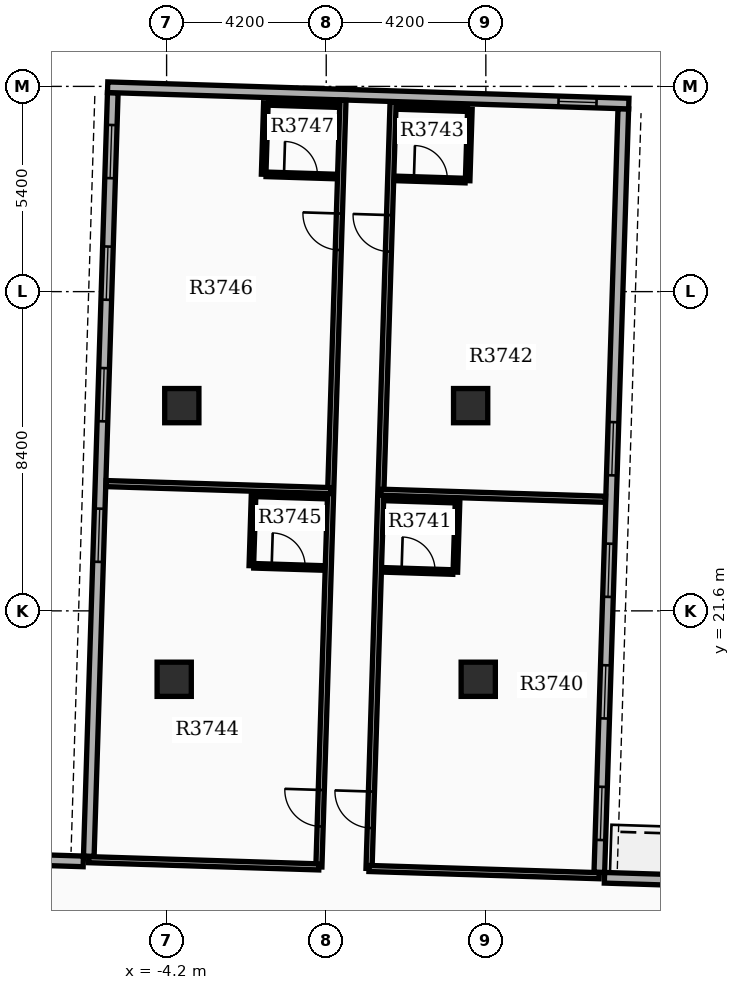
"""IFC4 building model, lengths in metres.
Left out: names, types, materials, properties, quantities, classifications, styles, units other than length and angle.
Written with IfcOpenShell. Run it as: python <this file> out.ifc"""

import sys

from ifc_helpers import new_model, si_unit, direction, frame, frame_2d, origin, origin_2d, place, context, subcontext, project, spatial, rectangle, extrude, element, fill, save


model = new_model("IFC4")
c1 = context("Model", 3, precision=1e-05, world=origin(), true_north=direction((0.0, 1.0)))
c2 = subcontext(c1, "Body", "Model", "MODEL_VIEW")
j1 = project(units=[si_unit("LENGTHUNIT", "METRE"), si_unit("PLANEANGLEUNIT", "RADIAN")], contexts=[c1])
p1 = place(None, origin())
s1 = spatial("IfcSite", under=j1, at=p1, CompositionType="ELEMENT")
p2 = place(p1, origin())
s2 = spatial("IfcBuilding", under=s1, at=p2, CompositionType="ELEMENT")
p3 = place(p2, frame((0.0, 0.0, 232.5)))
s3 = spatial("IfcBuildingStorey", under=s2, at=p3, CompositionType="ELEMENT", Elevation=232.5)
for number, where, z_axis, x_axis in (
    (1, (-4.0, 19.8, 0.0), (0.0, 0.0, 1.0), (1.0, 0.0, 0.0)),
    (2, (4.0, 19.8, 0.0), (0.0, 0.0, 1.0), (1.0, 0.0, 0.0)),
    (3, (-3.8, 27.0, 0.0), (0.0, 0.0, 1.0), (1.0, 0.0, 0.0)),
    (4, (3.8, 27.0, 0.0), (0.0, 0.0, 1.0), (1.0, 0.0, 0.0)),
):
    element("IfcColumn", number, at=place(p3, frame(where, z_axis=z_axis, x_axis=x_axis)), inside=s3, PredefinedType="COLUMN", context=c2, shape_type="SweptSolid", body=[
        extrude(rectangle(XDim=0.9, YDim=0.9, at=origin_2d()), origin(), (0.0, 0.0, 1.0), 3.9),
    ])
p4 = place(p3, frame((7.186, 14.721, 0.0), z_axis=(0.0, 0.0, 1.0), x_axis=(0.031410322165, 0.999506574096, 0.0)))
e5 = element("IfcWall", 5, at=p4, inside=s3, PredefinedType="STANDARD", context=c2, shape_type="SweptSolid", body=[
    extrude(rectangle(XDim=20.1, YDim=0.28, at=frame_2d((10.05, 0.0))), origin(), (0.0, 0.0, 1.0), 3.18),
])
p5 = place(p4, frame((0.85, 0.0, 0.8)))
e6 = element("IfcOpeningElement", 6, at=p5, cuts=e5, PredefinedType="OPENING", context=c2, shape_type="SweptSolid", body=[
    extrude(rectangle(XDim=1.4, YDim=1.6, at=frame_2d((0.7, 0.8))), frame((0.0, 0.15, 0.0), z_axis=(0.0, -1.0, 0.0), x_axis=(1.0, 0.0, 0.0)), (0.0, 0.0, 1.0), 0.3),
])
p6 = place(p4, frame((4.05, 0.0, 0.8)))
e7 = element("IfcOpeningElement", 7, at=p6, cuts=e5, PredefinedType="OPENING", context=c2, shape_type="SweptSolid", body=[
    extrude(rectangle(XDim=1.4, YDim=1.6, at=frame_2d((0.7, 0.8))), frame((0.0, 0.15, 0.0), z_axis=(0.0, -1.0, 0.0), x_axis=(1.0, 0.0, 0.0)), (0.0, 0.0, 1.0), 0.3),
])
p7 = place(p4, frame((7.25, 0.0, 0.8)))
e8 = element("IfcOpeningElement", 8, at=p7, cuts=e5, PredefinedType="OPENING", context=c2, shape_type="SweptSolid", body=[
    extrude(rectangle(XDim=1.4, YDim=1.6, at=frame_2d((0.7, 0.8))), frame((0.0, 0.15, 0.0), z_axis=(0.0, -1.0, 0.0), x_axis=(1.0, 0.0, 0.0)), (0.0, 0.0, 1.0), 0.3),
])
p8 = place(p4, frame((10.45, 0.0, 0.8)))
e9 = element("IfcOpeningElement", 9, at=p8, cuts=e5, PredefinedType="OPENING", context=c2, shape_type="SweptSolid", body=[
    extrude(rectangle(XDim=1.4, YDim=1.6, at=frame_2d((0.7, 0.8))), frame((0.0, 0.15, 0.0), z_axis=(0.0, -1.0, 0.0), x_axis=(1.0, 0.0, 0.0)), (0.0, 0.0, 1.0), 0.3),
])
p9 = place(p3, frame((-5.616, 35.234, 0.0), z_axis=(0.0, 0.0, 1.0), x_axis=(-0.031398187845, -0.999506955354, 0.0)))
e10 = element("IfcWall", 10, at=p9, inside=s3, PredefinedType="STANDARD", context=c2, shape_type="SweptSolid", body=[
    extrude(rectangle(XDim=20.1, YDim=0.28, at=frame_2d((10.05, 0.0))), origin(), (0.0, 0.0, 1.0), 3.18),
])
p10 = place(p9, frame((0.85, 0.0, 0.8)))
e11 = element("IfcOpeningElement", 11, at=p10, cuts=e10, PredefinedType="OPENING", context=c2, shape_type="SweptSolid", body=[
    extrude(rectangle(XDim=1.4, YDim=1.6, at=frame_2d((0.7, 0.8))), frame((0.0, 0.15, 0.0), z_axis=(0.0, -1.0, 0.0), x_axis=(1.0, 0.0, 0.0)), (0.0, 0.0, 1.0), 0.3),
])
p11 = place(p9, frame((4.05, 0.0, 0.8)))
e12 = element("IfcOpeningElement", 12, at=p11, cuts=e10, PredefinedType="OPENING", context=c2, shape_type="SweptSolid", body=[
    extrude(rectangle(XDim=1.4, YDim=1.6, at=frame_2d((0.7, 0.8))), frame((0.0, 0.15, 0.0), z_axis=(0.0, -1.0, 0.0), x_axis=(1.0, 0.0, 0.0)), (0.0, 0.0, 1.0), 0.3),
])
p12 = place(p9, frame((7.25, 0.0, 0.8)))
e13 = element("IfcOpeningElement", 13, at=p12, cuts=e10, PredefinedType="OPENING", context=c2, shape_type="SweptSolid", body=[
    extrude(rectangle(XDim=1.4, YDim=1.6, at=frame_2d((0.7, 0.8))), frame((0.0, 0.15, 0.0), z_axis=(0.0, -1.0, 0.0), x_axis=(1.0, 0.0, 0.0)), (0.0, 0.0, 1.0), 0.3),
])
p13 = place(p9, frame((10.95, 0.0, 0.8)))
e14 = element("IfcOpeningElement", 14, at=p13, cuts=e10, PredefinedType="OPENING", context=c2, shape_type="SweptSolid", body=[
    extrude(rectangle(XDim=1.4, YDim=1.6, at=frame_2d((0.7, 0.8))), frame((0.0, 0.15, 0.0), z_axis=(0.0, -1.0, 0.0), x_axis=(1.0, 0.0, 0.0)), (0.0, 0.0, 1.0), 0.3),
])
p14 = place(p3, frame((7.962, 34.947, 0.0), z_axis=(0.0, 0.0, 1.0), x_axis=(-0.999506679556, 0.031406966164, 0.0)))
e15 = element("IfcWall", 15, at=p14, inside=s3, PredefinedType="STANDARD", context=c2, shape_type="SweptSolid", body=[
    extrude(rectangle(XDim=13.72, YDim=0.28, at=frame_2d((6.86, 0.0))), origin(), (0.0, 0.0, 1.0), 3.18),
])
p15 = place(p14, frame((0.85, 0.0, 0.85)))
e16 = element("IfcOpeningElement", 16, at=p15, cuts=e15, PredefinedType="OPENING", context=c2, shape_type="SweptSolid", body=[
    extrude(rectangle(XDim=1.0, YDim=1.5, at=frame_2d((0.5, 0.75))), frame((0.0, 0.15, 0.0), z_axis=(0.0, -1.0, 0.0), x_axis=(1.0, 0.0, 0.0)), (0.0, 0.0, 1.0), 0.3),
])
p16 = place(p3, frame((13.618, 14.379, 0.0), z_axis=(0.0, 0.0, 1.0), x_axis=(-0.999507224741, 0.031389611199, 0.0)))
e17 = element("IfcWall", 17, at=p16, inside=s3, PredefinedType="STANDARD", context=c2, shape_type="SweptSolid", body=[
    extrude(rectangle(XDim=6.3, YDim=0.28, at=frame_2d((3.15, 0.0))), origin(), (0.0, 0.0, 1.0), 3.18),
])
p17 = place(p3, frame((-12.689, 15.206, 0.0), z_axis=(0.0, 0.0, 1.0), x_axis=(0.999507262922, -0.031388395416, 0.0)))
e18 = element("IfcWall", 18, at=p17, inside=s3, PredefinedType="STANDARD", context=c2, shape_type="SweptSolid", body=[
    extrude(rectangle(XDim=6.3, YDim=0.28, at=frame_2d((3.15, 0.0))), origin(), (0.0, 0.0, 1.0), 3.18),
])
p18 = place(p3, frame((1.126, 14.822, 0.0), z_axis=(0.0, 0.0, 1.0), x_axis=(0.031403945422, 0.99950677447, 0.0)))
e19 = element("IfcWall", 19, at=p18, inside=s3, PredefinedType="PARTITIONING", context=c2, shape_type="SweptSolid", body=[
    extrude(rectangle(XDim=20.182, YDim=0.16, at=frame_2d((10.091, 0.0))), origin(), (0.0, 0.0, 1.0), 3.17),
])
p19 = place(p18, frame((1.065, 0.0, 0.0)))
e20 = element("IfcOpeningElement", 20, at=p19, cuts=e19, PredefinedType="OPENING", context=c2, shape_type="SweptSolid", body=[
    extrude(rectangle(XDim=0.96, YDim=2.15, at=frame_2d((0.48, 1.075))), frame((0.0, 0.09, 0.0), z_axis=(0.0, -1.0, 0.0), x_axis=(1.0, 0.0, 0.0)), (0.0, 0.0, 1.0), 0.18),
])
p20 = place(p18, frame((16.24, 0.0, 0.0)))
e21 = element("IfcOpeningElement", 21, at=p20, cuts=e19, PredefinedType="OPENING", context=c2, shape_type="SweptSolid", body=[
    extrude(rectangle(XDim=0.96, YDim=2.15, at=frame_2d((0.48, 1.075))), frame((0.0, 0.09, 0.0), z_axis=(0.0, -1.0, 0.0), x_axis=(1.0, 0.0, 0.0)), (0.0, 0.0, 1.0), 0.18),
])
p21 = place(p3, frame((1.126, 14.822, 0.0), z_axis=(0.0, 0.0, 1.0), x_axis=(0.999506122926, -0.031424675557, 0.0)))
e22 = element("IfcWall", 22, at=p21, inside=s3, PredefinedType="PARTITIONING", context=c2, shape_type="SweptSolid", body=[
    extrude(rectangle(XDim=6.06, YDim=0.16, at=frame_2d((3.03, 0.0))), origin(), (0.0, 0.0, 1.0), 3.17),
])
p22 = place(p3, frame((1.437, 24.722, 0.0), z_axis=(0.0, 0.0, 1.0), x_axis=(0.999506054485, -0.031426852351, 0.0)))
e23 = element("IfcWall", 23, at=p22, inside=s3, PredefinedType="PARTITIONING", context=c2, shape_type="SweptSolid", body=[
    extrude(rectangle(XDim=5.912, YDim=0.16, at=frame_2d((2.956, 0.0))), origin(), (0.0, 0.0, 1.0), 3.17),
])
p23 = place(p3, frame((1.513, 22.679, 0.0), z_axis=(0.0, 0.0, 1.0), x_axis=(0.999507221803, -0.031389704724, 0.0)))
e24 = element("IfcWall", 24, at=p23, inside=s3, PredefinedType="PARTITIONING", context=c2, shape_type="SweptSolid", body=[
    extrude(rectangle(XDim=1.82, YDim=0.12, at=frame_2d((0.91, 0.0))), origin(), (0.0, 0.0, 1.0), 3.17),
])
p24 = place(p23, frame((0.47, 0.0, 0.0)))
e25 = element("IfcOpeningElement", 25, at=p24, cuts=e24, PredefinedType="OPENING", context=c2, shape_type="SweptSolid", body=[
    extrude(rectangle(XDim=0.88, YDim=2.1, at=frame_2d((0.44, 1.05))), frame((0.0, 0.07, 0.0), z_axis=(0.0, -1.0, 0.0), x_axis=(1.0, 0.0, 0.0)), (0.0, 0.0, 1.0), 0.14),
])
p25 = place(p3, frame((1.572, 24.558, 0.0), z_axis=(0.0, 0.0, 1.0), x_axis=(0.999507221803, -0.031389704724, 0.0)))
e26 = element("IfcWall", 26, at=p25, inside=s3, PredefinedType="PARTITIONING", context=c2, shape_type="SweptSolid", body=[
    extrude(rectangle(XDim=1.82, YDim=0.12, at=frame_2d((0.91, 0.0))), origin(), (0.0, 0.0, 1.0), 3.17),
])
p26 = place(p3, frame((3.397, 22.619, 0.0), z_axis=(0.0, 0.0, 1.0), x_axis=(0.031425292588, 0.999506103526, 0.0)))
e27 = element("IfcWall", 27, at=p26, inside=s3, PredefinedType="PARTITIONING", context=c2, shape_type="SweptSolid", body=[
    extrude(rectangle(XDim=1.88, YDim=0.12, at=frame_2d((0.94, 0.0))), origin(), (0.0, 0.0, 1.0), 3.17),
])
p27 = place(p3, frame((1.837, 32.979, 0.0), z_axis=(0.0, 0.0, 1.0), x_axis=(0.999507221803, -0.031389704724, 0.0)))
e28 = element("IfcWall", 28, at=p27, inside=s3, PredefinedType="PARTITIONING", context=c2, shape_type="SweptSolid", body=[
    extrude(rectangle(XDim=1.82, YDim=0.12, at=frame_2d((0.91, 0.0))), origin(), (0.0, 0.0, 1.0), 3.17),
])
p28 = place(p27, frame((0.47, 0.0, 0.0)))
e29 = element("IfcOpeningElement", 29, at=p28, cuts=e28, PredefinedType="OPENING", context=c2, shape_type="SweptSolid", body=[
    extrude(rectangle(XDim=0.88, YDim=2.1, at=frame_2d((0.44, 1.05))), frame((0.0, 0.07, 0.0), z_axis=(0.0, -1.0, 0.0), x_axis=(1.0, 0.0, 0.0)), (0.0, 0.0, 1.0), 0.14),
])
p29 = place(p3, frame((1.896, 34.858, 0.0), z_axis=(0.0, 0.0, 1.0), x_axis=(0.999507221803, -0.031389704724, 0.0)))
e30 = element("IfcWall", 30, at=p29, inside=s3, PredefinedType="PARTITIONING", context=c2, shape_type="SweptSolid", body=[
    extrude(rectangle(XDim=1.82, YDim=0.12, at=frame_2d((0.91, 0.0))), origin(), (0.0, 0.0, 1.0), 3.17),
])
p30 = place(p3, frame((3.721, 32.919, 0.0), z_axis=(0.0, 0.0, 1.0), x_axis=(0.031299625942, 0.999510046681, 0.0)))
e31 = element("IfcWall", 31, at=p30, inside=s3, PredefinedType="PARTITIONING", context=c2, shape_type="SweptSolid", body=[
    extrude(rectangle(XDim=1.88, YDim=0.12, at=frame_2d((0.94, 0.0))), origin(), (0.0, 0.0, 1.0), 3.17),
])
p31 = place(p3, frame((-0.193, 14.863, 0.0), z_axis=(0.0, 0.0, 1.0), x_axis=(0.031415650687, 0.999506406629, 0.0)))
e32 = element("IfcWall", 32, at=p31, inside=s3, PredefinedType="PARTITIONING", context=c2, shape_type="SweptSolid", body=[
    extrude(rectangle(XDim=20.182, YDim=0.16, at=frame_2d((10.091, 0.0))), origin(), (0.0, 0.0, 1.0), 3.17),
])
p32 = place(p31, frame((1.065, 0.0, 0.0)))
e33 = element("IfcOpeningElement", 33, at=p32, cuts=e32, PredefinedType="OPENING", context=c2, shape_type="SweptSolid", body=[
    extrude(rectangle(XDim=0.96, YDim=2.15, at=frame_2d((0.48, 1.075))), frame((0.0, 0.09, 0.0), z_axis=(0.0, -1.0, 0.0), x_axis=(1.0, 0.0, 0.0)), (0.0, 0.0, 1.0), 0.18),
])
p33 = place(p31, frame((16.24, 0.0, 0.0)))
e34 = element("IfcOpeningElement", 34, at=p33, cuts=e32, PredefinedType="OPENING", context=c2, shape_type="SweptSolid", body=[
    extrude(rectangle(XDim=0.96, YDim=2.15, at=frame_2d((0.48, 1.075))), frame((0.0, 0.09, 0.0), z_axis=(0.0, -1.0, 0.0), x_axis=(1.0, 0.0, 0.0)), (0.0, 0.0, 1.0), 0.18),
])
p34 = place(p3, frame((-0.193, 14.863, 0.0), z_axis=(0.0, 0.0, 1.0), x_axis=(-0.999506162708, 0.031423410194, 0.0)))
e35 = element("IfcWall", 35, at=p34, inside=s3, PredefinedType="PARTITIONING", context=c2, shape_type="SweptSolid", body=[
    extrude(rectangle(XDim=6.06, YDim=0.16, at=frame_2d((3.03, 0.0))), origin(), (0.0, 0.0, 1.0), 3.17),
])
p35 = place(p3, frame((0.118, 24.763, 0.0), z_axis=(0.0, 0.0, 1.0), x_axis=(-0.999506095269, 0.031425555218, 0.0)))
e36 = element("IfcWall", 36, at=p35, inside=s3, PredefinedType="PARTITIONING", context=c2, shape_type="SweptSolid", body=[
    extrude(rectangle(XDim=5.912, YDim=0.16, at=frame_2d((2.956, 0.0))), origin(), (0.0, 0.0, 1.0), 3.17),
])
p36 = place(p3, frame((-1.905, 22.786, 0.0), z_axis=(0.0, 0.0, 1.0), x_axis=(0.999507221803, -0.031389704724, 0.0)))
e37 = element("IfcWall", 37, at=p36, inside=s3, PredefinedType="PARTITIONING", context=c2, shape_type="SweptSolid", body=[
    extrude(rectangle(XDim=1.82, YDim=0.12, at=frame_2d((0.91, 0.0))), origin(), (0.0, 0.0, 1.0), 3.17),
])
p37 = place(p36, frame((0.47, 0.0, 0.0)))
e38 = element("IfcOpeningElement", 38, at=p37, cuts=e37, PredefinedType="OPENING", context=c2, shape_type="SweptSolid", body=[
    extrude(rectangle(XDim=0.88, YDim=2.1, at=frame_2d((0.44, 1.05))), frame((0.0, 0.07, 0.0), z_axis=(0.0, -1.0, 0.0), x_axis=(1.0, 0.0, 0.0)), (0.0, 0.0, 1.0), 0.14),
])
p38 = place(p3, frame((-1.846, 24.665, 0.0), z_axis=(0.0, 0.0, 1.0), x_axis=(0.999503004171, -0.03152371574, 0.0)))
e39 = element("IfcWall", 39, at=p38, inside=s3, PredefinedType="PARTITIONING", context=c2, shape_type="SweptSolid", body=[
    extrude(rectangle(XDim=1.82, YDim=0.12, at=frame_2d((0.91, 0.0))), origin(), (0.0, 0.0, 1.0), 3.17),
])
p39 = place(p3, frame((-1.97, 22.788, 0.0), z_axis=(0.0, 0.0, 1.0), x_axis=(0.031425292588, 0.999506103526, 0.0)))
e40 = element("IfcWall", 40, at=p39, inside=s3, PredefinedType="PARTITIONING", context=c2, shape_type="SweptSolid", body=[
    extrude(rectangle(XDim=1.88, YDim=0.12, at=frame_2d((0.94, 0.0))), origin(), (0.0, 0.0, 1.0), 3.17),
])
p40 = place(p3, frame((-1.582, 33.086, 0.0), z_axis=(0.0, 0.0, 1.0), x_axis=(0.999507221803, -0.031389704724, 0.0)))
e41 = element("IfcWall", 41, at=p40, inside=s3, PredefinedType="PARTITIONING", context=c2, shape_type="SweptSolid", body=[
    extrude(rectangle(XDim=1.82, YDim=0.12, at=frame_2d((0.91, 0.0))), origin(), (0.0, 0.0, 1.0), 3.17),
])
p41 = place(p40, frame((0.47, 0.0, 0.0)))
e42 = element("IfcOpeningElement", 42, at=p41, cuts=e41, PredefinedType="OPENING", context=c2, shape_type="SweptSolid", body=[
    extrude(rectangle(XDim=0.88, YDim=2.1, at=frame_2d((0.44, 1.05))), frame((0.0, 0.07, 0.0), z_axis=(0.0, -1.0, 0.0), x_axis=(1.0, 0.0, 0.0)), (0.0, 0.0, 1.0), 0.14),
])
p42 = place(p3, frame((-1.522, 34.965, 0.0), z_axis=(0.0, 0.0, 1.0), x_axis=(0.999507221803, -0.031389704724, 0.0)))
e43 = element("IfcWall", 43, at=p42, inside=s3, PredefinedType="PARTITIONING", context=c2, shape_type="SweptSolid", body=[
    extrude(rectangle(XDim=1.82, YDim=0.12, at=frame_2d((0.91, 0.0))), origin(), (0.0, 0.0, 1.0), 3.17),
])
p43 = place(p3, frame((-1.646, 33.088, 0.0), z_axis=(0.0, 0.0, 1.0), x_axis=(0.031425292588, 0.999506103526, 0.0)))
e44 = element("IfcWall", 44, at=p43, inside=s3, PredefinedType="PARTITIONING", context=c2, shape_type="SweptSolid", body=[
    extrude(rectangle(XDim=1.88, YDim=0.12, at=frame_2d((0.94, 0.0))), origin(), (0.0, 0.0, 1.0), 3.17),
])
p44 = place(p5, origin())
e45 = element("IfcWindow", 45, at=p44, inside=s3, PartitioningType="SINGLE_PANEL", PredefinedType="WINDOW", context=c2, shape_type="SweptSolid", body=[
    extrude(rectangle(XDim=1.4, YDim=1.6, at=frame_2d((0.7, 0.8))), frame((0.0, 0.03, 0.0), z_axis=(0.0, -1.0, 0.0), x_axis=(1.0, 0.0, 0.0)), (0.0, 0.0, 1.0), 0.06),
])
fill(e6, e45)
p45 = place(p6, origin())
e46 = element("IfcWindow", 46, at=p45, inside=s3, PartitioningType="SINGLE_PANEL", PredefinedType="WINDOW", context=c2, shape_type="SweptSolid", body=[
    extrude(rectangle(XDim=1.4, YDim=1.6, at=frame_2d((0.7, 0.8))), frame((0.0, 0.03, 0.0), z_axis=(0.0, -1.0, 0.0), x_axis=(1.0, 0.0, 0.0)), (0.0, 0.0, 1.0), 0.06),
])
fill(e7, e46)
p46 = place(p7, origin())
e47 = element("IfcWindow", 47, at=p46, inside=s3, PartitioningType="SINGLE_PANEL", PredefinedType="WINDOW", context=c2, shape_type="SweptSolid", body=[
    extrude(rectangle(XDim=1.4, YDim=1.6, at=frame_2d((0.7, 0.8))), frame((0.0, 0.03, 0.0), z_axis=(0.0, -1.0, 0.0), x_axis=(1.0, 0.0, 0.0)), (0.0, 0.0, 1.0), 0.06),
])
fill(e8, e47)
p47 = place(p8, origin())
e48 = element("IfcWindow", 48, at=p47, inside=s3, PartitioningType="SINGLE_PANEL", PredefinedType="WINDOW", context=c2, shape_type="SweptSolid", body=[
    extrude(rectangle(XDim=1.4, YDim=1.6, at=frame_2d((0.7, 0.8))), frame((0.0, 0.03, 0.0), z_axis=(0.0, -1.0, 0.0), x_axis=(1.0, 0.0, 0.0)), (0.0, 0.0, 1.0), 0.06),
])
fill(e9, e48)
p48 = place(p10, origin())
e49 = element("IfcWindow", 49, at=p48, inside=s3, PartitioningType="SINGLE_PANEL", PredefinedType="WINDOW", context=c2, shape_type="SweptSolid", body=[
    extrude(rectangle(XDim=1.4, YDim=1.6, at=frame_2d((0.7, 0.8))), frame((0.0, 0.03, 0.0), z_axis=(0.0, -1.0, 0.0), x_axis=(1.0, 0.0, 0.0)), (0.0, 0.0, 1.0), 0.06),
])
fill(e11, e49)
p49 = place(p11, origin())
e50 = element("IfcWindow", 50, at=p49, inside=s3, PartitioningType="SINGLE_PANEL", PredefinedType="WINDOW", context=c2, shape_type="SweptSolid", body=[
    extrude(rectangle(XDim=1.4, YDim=1.6, at=frame_2d((0.7, 0.8))), frame((0.0, 0.03, 0.0), z_axis=(0.0, -1.0, 0.0), x_axis=(1.0, 0.0, 0.0)), (0.0, 0.0, 1.0), 0.06),
])
fill(e12, e50)
p50 = place(p12, origin())
e51 = element("IfcWindow", 51, at=p50, inside=s3, PartitioningType="SINGLE_PANEL", PredefinedType="WINDOW", context=c2, shape_type="SweptSolid", body=[
    extrude(rectangle(XDim=1.4, YDim=1.6, at=frame_2d((0.7, 0.8))), frame((0.0, 0.03, 0.0), z_axis=(0.0, -1.0, 0.0), x_axis=(1.0, 0.0, 0.0)), (0.0, 0.0, 1.0), 0.06),
])
fill(e13, e51)
p51 = place(p13, origin())
e52 = element("IfcWindow", 52, at=p51, inside=s3, PartitioningType="SINGLE_PANEL", PredefinedType="WINDOW", context=c2, shape_type="SweptSolid", body=[
    extrude(rectangle(XDim=1.4, YDim=1.6, at=frame_2d((0.7, 0.8))), frame((0.0, 0.03, 0.0), z_axis=(0.0, -1.0, 0.0), x_axis=(1.0, 0.0, 0.0)), (0.0, 0.0, 1.0), 0.06),
])
fill(e14, e52)
p52 = place(p15, origin())
e53 = element("IfcWindow", 53, at=p52, inside=s3, PartitioningType="SINGLE_PANEL", PredefinedType="WINDOW", context=c2, shape_type="SweptSolid", body=[
    extrude(rectangle(XDim=1.0, YDim=1.5, at=frame_2d((0.5, 0.75))), frame((0.0, 0.03, 0.0), z_axis=(0.0, -1.0, 0.0), x_axis=(1.0, 0.0, 0.0)), (0.0, 0.0, 1.0), 0.06),
])
fill(e16, e53)
p53 = place(p19, origin())
e54 = element("IfcDoor", 54, at=p53, inside=s3, OperationType="SINGLE_SWING_RIGHT", PredefinedType="DOOR", context=c2, shape_type="SweptSolid", body=[
    extrude(rectangle(XDim=0.96, YDim=2.15, at=frame_2d((0.48, 1.075))), frame((0.0, 0.025, 0.0), z_axis=(0.0, -1.0, 0.0), x_axis=(1.0, 0.0, 0.0)), (0.0, 0.0, 1.0), 0.05),
])
fill(e20, e54)
p54 = place(p24, origin())
e55 = element("IfcDoor", 55, at=p54, inside=s3, OperationType="SINGLE_SWING_LEFT", PredefinedType="DOOR", context=c2, shape_type="SweptSolid", body=[
    extrude(rectangle(XDim=0.88, YDim=2.1, at=frame_2d((0.44, 1.05))), frame((0.0, 0.025, 0.0), z_axis=(0.0, -1.0, 0.0), x_axis=(1.0, 0.0, 0.0)), (0.0, 0.0, 1.0), 0.05),
])
fill(e25, e55)
p55 = place(p20, origin())
e56 = element("IfcDoor", 56, at=p55, inside=s3, OperationType="SINGLE_SWING_RIGHT", PredefinedType="DOOR", context=c2, shape_type="SweptSolid", body=[
    extrude(rectangle(XDim=0.96, YDim=2.15, at=frame_2d((0.48, 1.075))), frame((0.0, 0.025, 0.0), z_axis=(0.0, -1.0, 0.0), x_axis=(1.0, 0.0, 0.0)), (0.0, 0.0, 1.0), 0.05),
])
fill(e21, e56)
p56 = place(p28, origin())
e57 = element("IfcDoor", 57, at=p56, inside=s3, OperationType="SINGLE_SWING_LEFT", PredefinedType="DOOR", context=c2, shape_type="SweptSolid", body=[
    extrude(rectangle(XDim=0.88, YDim=2.1, at=frame_2d((0.44, 1.05))), frame((0.0, 0.025, 0.0), z_axis=(0.0, -1.0, 0.0), x_axis=(1.0, 0.0, 0.0)), (0.0, 0.0, 1.0), 0.05),
])
fill(e29, e57)
p57 = place(p32, origin())
e58 = element("IfcDoor", 58, at=p57, inside=s3, OperationType="SINGLE_SWING_RIGHT", PredefinedType="DOOR", context=c2, shape_type="SweptSolid", body=[
    extrude(rectangle(XDim=0.96, YDim=2.15, at=frame_2d((0.48, 1.075))), frame((0.0, 0.025, 0.0), z_axis=(0.0, -1.0, 0.0), x_axis=(1.0, 0.0, 0.0)), (0.0, 0.0, 1.0), 0.05),
])
fill(e33, e58)
p58 = place(p37, origin())
e59 = element("IfcDoor", 59, at=p58, inside=s3, OperationType="SINGLE_SWING_LEFT", PredefinedType="DOOR", context=c2, shape_type="SweptSolid", body=[
    extrude(rectangle(XDim=0.88, YDim=2.1, at=frame_2d((0.44, 1.05))), frame((0.0, 0.025, 0.0), z_axis=(0.0, -1.0, 0.0), x_axis=(1.0, 0.0, 0.0)), (0.0, 0.0, 1.0), 0.05),
])
fill(e38, e59)
p59 = place(p33, origin())
e60 = element("IfcDoor", 60, at=p59, inside=s3, OperationType="SINGLE_SWING_RIGHT", PredefinedType="DOOR", context=c2, shape_type="SweptSolid", body=[
    extrude(rectangle(XDim=0.96, YDim=2.15, at=frame_2d((0.48, 1.075))), frame((0.0, 0.025, 0.0), z_axis=(0.0, -1.0, 0.0), x_axis=(1.0, 0.0, 0.0)), (0.0, 0.0, 1.0), 0.05),
])
fill(e34, e60)
p60 = place(p41, origin())
e61 = element("IfcDoor", 61, at=p60, inside=s3, OperationType="SINGLE_SWING_LEFT", PredefinedType="DOOR", context=c2, shape_type="SweptSolid", body=[
    extrude(rectangle(XDim=0.88, YDim=2.1, at=frame_2d((0.44, 1.05))), frame((0.0, 0.025, 0.0), z_axis=(0.0, -1.0, 0.0), x_axis=(1.0, 0.0, 0.0)), (0.0, 0.0, 1.0), 0.05),
])
fill(e42, e61)
save(model, sys.argv[1])
